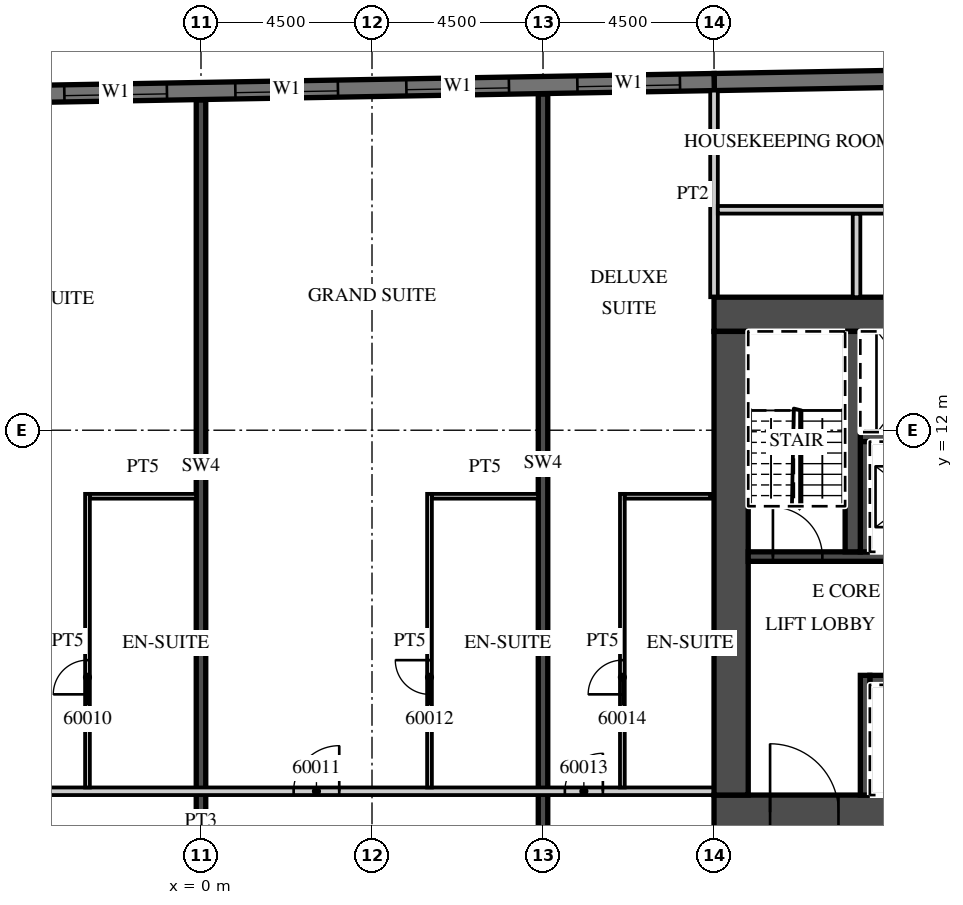
"""IFC4 building model, lengths in metres.
Left out: names, types, materials, properties, quantities, classifications, styles, units other than length and angle.
Written with IfcOpenShell. Run it as: python <this file> out.ifc"""

import sys

from ifc_helpers import new_model, si_unit, direction, frame, frame_2d, origin, place, context, subcontext, project, spatial, rectangle, extrude, element, fill, save


model = new_model("IFC4")
c1 = context("Model", 3, precision=1e-05, world=origin(), true_north=direction((0.0, 1.0)))
c2 = subcontext(c1, "Body", "Model", "MODEL_VIEW")
j1 = project(units=[si_unit("LENGTHUNIT", "METRE"), si_unit("PLANEANGLEUNIT", "RADIAN")], contexts=[c1])
p1 = place(None, origin())
s1 = spatial("IfcSite", under=j1, at=p1, CompositionType="ELEMENT")
p2 = place(p1, origin())
s2 = spatial("IfcBuilding", under=s1, at=p2, CompositionType="ELEMENT")
p3 = place(p2, frame((0.0, 0.0, 244.1)))
s3 = spatial("IfcBuildingStorey", under=s2, at=p3, CompositionType="ELEMENT", Elevation=244.1)
p4 = place(p3, frame((0.0, 1.4, 0.0), z_axis=(0.0, 0.0, 1.0), x_axis=(0.0, 1.0, 0.0)))
e1 = element("IfcWall", 1, at=p4, inside=s3, PredefinedType="SHEAR", context=c2, shape_type="SweptSolid", body=[
    extrude(rectangle(XDim=19.289, YDim=0.25, at=frame_2d((9.644, 0.0))), origin(), (0.0, 0.0, 1.0), 3.3),
])
p5 = place(p3, frame((9.0, 1.4, 0.0), z_axis=(0.0, 0.0, 1.0), x_axis=(0.0, 1.0, 0.0)))
e2 = element("IfcWall", 2, at=p5, inside=s3, PredefinedType="SHEAR", context=c2, shape_type="SweptSolid", body=[
    extrude(rectangle(XDim=19.446, YDim=0.25, at=frame_2d((9.723, 0.0))), origin(), (0.0, 0.0, 1.0), 3.3),
])
p6 = place(p3, frame((31.504, 21.476, 0.0), z_axis=(0.0, 0.0, 1.0), x_axis=(-0.999847677887, -0.017453395744, 0.0)))
e3 = element("IfcWall", 3, at=p6, inside=s3, PredefinedType="SOLIDWALL", context=c2, shape_type="SweptSolid", body=[
    extrude(rectangle(XDim=18.003, YDim=0.45, at=frame_2d((9.001, 0.0))), origin(), (0.0, 0.0, 1.0), 3.02),
])
p7 = place(p3, frame((13.504, 21.161, 0.0), z_axis=(0.0, 0.0, 1.0), x_axis=(-0.999847763257, -0.017448504532, 0.0)))
e4 = element("IfcWall", 4, at=p7, inside=s3, PredefinedType="SOLIDWALL", context=c2, shape_type="SweptSolid", body=[
    extrude(rectangle(XDim=46.859, YDim=0.45, at=frame_2d((23.43, 0.0))), origin(), (0.0, 0.0, 1.0), 3.02),
])
p8 = place(p7, frame((0.9, 0.0, 0.45)))
e5 = element("IfcOpeningElement", 5, at=p8, cuts=e4, PredefinedType="OPENING", context=c2, shape_type="SweptSolid", body=[
    extrude(rectangle(XDim=2.7, YDim=2.25, at=frame_2d((1.35, 1.125))), frame((0.0, 0.235, 0.0), z_axis=(0.0, -1.0, 0.0), x_axis=(1.0, 0.0, 0.0)), (0.0, 0.0, 1.0), 0.47),
])
p9 = place(p7, frame((5.401, 0.0, 0.45)))
e6 = element("IfcOpeningElement", 6, at=p9, cuts=e4, PredefinedType="OPENING", context=c2, shape_type="SweptSolid", body=[
    extrude(rectangle(XDim=2.7, YDim=2.25, at=frame_2d((1.35, 1.125))), frame((0.0, 0.235, 0.0), z_axis=(0.0, -1.0, 0.0), x_axis=(1.0, 0.0, 0.0)), (0.0, 0.0, 1.0), 0.47),
])
p10 = place(p7, frame((9.902, 0.0, 0.45)))
e7 = element("IfcOpeningElement", 7, at=p10, cuts=e4, PredefinedType="OPENING", context=c2, shape_type="SweptSolid", body=[
    extrude(rectangle(XDim=2.7, YDim=2.25, at=frame_2d((1.35, 1.125))), frame((0.0, 0.235, 0.0), z_axis=(0.0, -1.0, 0.0), x_axis=(1.0, 0.0, 0.0)), (0.0, 0.0, 1.0), 0.47),
])
p11 = place(p7, frame((14.402, 0.0, 0.45)))
e8 = element("IfcOpeningElement", 8, at=p11, cuts=e4, PredefinedType="OPENING", context=c2, shape_type="SweptSolid", body=[
    extrude(rectangle(XDim=2.7, YDim=2.25, at=frame_2d((1.35, 1.125))), frame((0.0, 0.235, 0.0), z_axis=(0.0, -1.0, 0.0), x_axis=(1.0, 0.0, 0.0)), (0.0, 0.0, 1.0), 0.47),
])
p12 = place(p7, frame((18.903, 0.0, 0.45)))
e9 = element("IfcOpeningElement", 9, at=p12, cuts=e4, PredefinedType="OPENING", context=c2, shape_type="SweptSolid", body=[
    extrude(rectangle(XDim=2.7, YDim=2.25, at=frame_2d((1.35, 1.125))), frame((0.0, 0.235, 0.0), z_axis=(0.0, -1.0, 0.0), x_axis=(1.0, 0.0, 0.0)), (0.0, 0.0, 1.0), 0.47),
])
p13 = place(p7, frame((23.404, 0.0, 0.45)))
e10 = element("IfcOpeningElement", 10, at=p13, cuts=e4, PredefinedType="OPENING", context=c2, shape_type="SweptSolid", body=[
    extrude(rectangle(XDim=2.7, YDim=2.25, at=frame_2d((1.35, 1.125))), frame((0.0, 0.235, 0.0), z_axis=(0.0, -1.0, 0.0), x_axis=(1.0, 0.0, 0.0)), (0.0, 0.0, 1.0), 0.47),
])
p14 = place(p7, frame((27.904, 0.0, 0.45)))
e11 = element("IfcOpeningElement", 11, at=p14, cuts=e4, PredefinedType="OPENING", context=c2, shape_type="SweptSolid", body=[
    extrude(rectangle(XDim=2.7, YDim=2.25, at=frame_2d((1.35, 1.125))), frame((0.0, 0.235, 0.0), z_axis=(0.0, -1.0, 0.0), x_axis=(1.0, 0.0, 0.0)), (0.0, 0.0, 1.0), 0.47),
])
p15 = place(p7, frame((32.405, 0.0, 0.45)))
e12 = element("IfcOpeningElement", 12, at=p15, cuts=e4, PredefinedType="OPENING", context=c2, shape_type="SweptSolid", body=[
    extrude(rectangle(XDim=2.7, YDim=2.25, at=frame_2d((1.35, 1.125))), frame((0.0, 0.235, 0.0), z_axis=(0.0, -1.0, 0.0), x_axis=(1.0, 0.0, 0.0)), (0.0, 0.0, 1.0), 0.47),
])
p16 = place(p7, frame((36.906, 0.0, 0.45)))
e13 = element("IfcOpeningElement", 13, at=p16, cuts=e4, PredefinedType="OPENING", context=c2, shape_type="SweptSolid", body=[
    extrude(rectangle(XDim=2.7, YDim=2.25, at=frame_2d((1.35, 1.125))), frame((0.0, 0.235, 0.0), z_axis=(0.0, -1.0, 0.0), x_axis=(1.0, 0.0, 0.0)), (0.0, 0.0, 1.0), 0.47),
])
p17 = place(p7, frame((41.406, 0.0, 0.45)))
e14 = element("IfcOpeningElement", 14, at=p17, cuts=e4, PredefinedType="OPENING", context=c2, shape_type="SweptSolid", body=[
    extrude(rectangle(XDim=2.7, YDim=2.25, at=frame_2d((1.35, 1.125))), frame((0.0, 0.235, 0.0), z_axis=(0.0, -1.0, 0.0), x_axis=(1.0, 0.0, 0.0)), (0.0, 0.0, 1.0), 0.47),
])
p18 = place(p3, frame((13.5, 15.5, 0.0), z_axis=(0.0, 0.0, 1.0), x_axis=(0.0, 1.0, 0.0)))
e15 = element("IfcWall", 15, at=p18, inside=s3, PredefinedType="PARTITIONING", context=c2, shape_type="SweptSolid", body=[
    extrude(rectangle(XDim=5.436, YDim=0.2, at=frame_2d((2.718, 0.0))), origin(), (0.0, 0.0, 1.0), 3.02),
])
p19 = place(p3, frame((-13.5, 2.5, 0.0), z_axis=(0.0, 0.0, 1.0), x_axis=(1.0, 0.0, 0.0)))
e16 = element("IfcWall", 16, at=p19, inside=s3, PredefinedType="PARTITIONING", context=c2, shape_type="SweptSolid", body=[
    extrude(rectangle(XDim=27.0, YDim=0.2, at=frame_2d((13.5, 0.0))), origin(), (0.0, 0.0, 1.0), 3.02),
])
p20 = place(p19, frame((0.575, 0.0, 0.0)))
e17 = element("IfcOpeningElement", 17, at=p20, cuts=e16, PredefinedType="OPENING", context=c2, shape_type="SweptSolid", body=[
    extrude(rectangle(XDim=1.0, YDim=2.1, at=frame_2d((0.5, 1.05))), frame((0.0, 0.11, 0.0), z_axis=(0.0, -1.0, 0.0), x_axis=(1.0, 0.0, 0.0)), (0.0, 0.0, 1.0), 0.22),
])
p21 = place(p19, frame((6.938, 0.0, 0.0)))
e18 = element("IfcOpeningElement", 18, at=p21, cuts=e16, PredefinedType="OPENING", context=c2, shape_type="SweptSolid", body=[
    extrude(rectangle(XDim=1.2, YDim=2.1, at=frame_2d((0.6, 1.05))), frame((0.0, 0.11, 0.0), z_axis=(0.0, -1.0, 0.0), x_axis=(1.0, 0.0, 0.0)), (0.0, 0.0, 1.0), 0.22),
])
p22 = place(p19, frame((15.938, 0.0, 0.0)))
e19 = element("IfcOpeningElement", 19, at=p22, cuts=e16, PredefinedType="OPENING", context=c2, shape_type="SweptSolid", body=[
    extrude(rectangle(XDim=1.2, YDim=2.1, at=frame_2d((0.6, 1.05))), frame((0.0, 0.11, 0.0), z_axis=(0.0, -1.0, 0.0), x_axis=(1.0, 0.0, 0.0)), (0.0, 0.0, 1.0), 0.22),
])
p23 = place(p19, frame((23.075, 0.0, 0.0)))
e20 = element("IfcOpeningElement", 20, at=p23, cuts=e16, PredefinedType="OPENING", context=c2, shape_type="SweptSolid", body=[
    extrude(rectangle(XDim=1.0, YDim=2.1, at=frame_2d((0.5, 1.05))), frame((0.0, 0.11, 0.0), z_axis=(0.0, -1.0, 0.0), x_axis=(1.0, 0.0, 0.0)), (0.0, 0.0, 1.0), 0.22),
])
p24 = place(p3, frame((-2.987, 2.6, 0.0), z_axis=(0.0, 0.0, 1.0), x_axis=(0.0, 1.0, 0.0)))
e21 = element("IfcWall", 21, at=p24, inside=s3, PredefinedType="PARTITIONING", context=c2, shape_type="SweptSolid", body=[
    extrude(rectangle(XDim=7.725, YDim=0.125, at=frame_2d((3.862, 0.0))), origin(), (0.0, 0.0, 1.0), 3.02),
])
p25 = place(p24, frame((2.45, 0.0, 0.0)))
e22 = element("IfcOpeningElement", 22, at=p25, cuts=e21, PredefinedType="OPENING", context=c2, shape_type="SweptSolid", body=[
    extrude(rectangle(XDim=0.9, YDim=2.1, at=frame_2d((0.45, 1.05))), frame((0.0, 0.073, 0.0), z_axis=(0.0, -1.0, 0.0), x_axis=(1.0, 0.0, 0.0)), (0.0, 0.0, 1.0), 0.145),
])
p26 = place(p3, frame((-2.925, 10.262, 0.0), z_axis=(0.0, 0.0, 1.0), x_axis=(1.0, 0.0, 0.0)))
e23 = element("IfcWall", 23, at=p26, inside=s3, PredefinedType="PARTITIONING", context=c2, shape_type="SweptSolid", body=[
    extrude(rectangle(XDim=2.8, YDim=0.125, at=frame_2d((1.4, 0.0))), origin(), (0.0, 0.0, 1.0), 3.02),
])
p27 = place(p3, frame((6.013, 2.6, 0.0), z_axis=(0.0, 0.0, 1.0), x_axis=(0.0, 1.0, 0.0)))
e24 = element("IfcWall", 24, at=p27, inside=s3, PredefinedType="PARTITIONING", context=c2, shape_type="SweptSolid", body=[
    extrude(rectangle(XDim=7.725, YDim=0.125, at=frame_2d((3.862, 0.0))), origin(), (0.0, 0.0, 1.0), 3.02),
])
p28 = place(p27, frame((2.45, 0.0, 0.0)))
e25 = element("IfcOpeningElement", 25, at=p28, cuts=e24, PredefinedType="OPENING", context=c2, shape_type="SweptSolid", body=[
    extrude(rectangle(XDim=0.9, YDim=2.1, at=frame_2d((0.45, 1.05))), frame((0.0, 0.073, 0.0), z_axis=(0.0, -1.0, 0.0), x_axis=(1.0, 0.0, 0.0)), (0.0, 0.0, 1.0), 0.145),
])
p29 = place(p3, frame((6.075, 10.262, 0.0), z_axis=(0.0, 0.0, 1.0), x_axis=(1.0, 0.0, 0.0)))
e26 = element("IfcWall", 26, at=p29, inside=s3, PredefinedType="PARTITIONING", context=c2, shape_type="SweptSolid", body=[
    extrude(rectangle(XDim=2.8, YDim=0.125, at=frame_2d((1.4, 0.0))), origin(), (0.0, 0.0, 1.0), 3.02),
])
p30 = place(p3, frame((11.088, 2.6, 0.0), z_axis=(0.0, 0.0, 1.0), x_axis=(0.0, 1.0, 0.0)))
e27 = element("IfcWall", 27, at=p30, inside=s3, PredefinedType="PARTITIONING", context=c2, shape_type="SweptSolid", body=[
    extrude(rectangle(XDim=7.725, YDim=0.125, at=frame_2d((3.862, 0.0))), origin(), (0.0, 0.0, 1.0), 3.02),
])
p31 = place(p30, frame((2.45, 0.0, 0.0)))
e28 = element("IfcOpeningElement", 28, at=p31, cuts=e27, PredefinedType="OPENING", context=c2, shape_type="SweptSolid", body=[
    extrude(rectangle(XDim=0.9, YDim=2.1, at=frame_2d((0.45, 1.05))), frame((0.0, 0.073, 0.0), z_axis=(0.0, -1.0, 0.0), x_axis=(1.0, 0.0, 0.0)), (0.0, 0.0, 1.0), 0.145),
])
p32 = place(p3, frame((11.15, 10.262, 0.0), z_axis=(0.0, 0.0, 1.0), x_axis=(1.0, 0.0, 0.0)))
e29 = element("IfcWall", 29, at=p32, inside=s3, PredefinedType="PARTITIONING", context=c2, shape_type="SweptSolid", body=[
    extrude(rectangle(XDim=2.25, YDim=0.125, at=frame_2d((1.125, 0.0))), origin(), (0.0, 0.0, 1.0), 3.02),
])
p33 = place(p3, frame((13.5, 1.95, 0.0), z_axis=(0.0, 0.0, 1.0), x_axis=(1.0, 0.0, 0.0)))
e30 = element("IfcWall", 30, at=p33, inside=s3, PredefinedType="SHEAR", context=c2, shape_type="SweptSolid", body=[
    extrude(rectangle(XDim=18.0, YDim=0.9, at=frame_2d((9.0, 0.0))), origin(), (0.0, 0.0, 1.0), 3.02),
])
p34 = place(p33, frame((1.475, 0.0, 0.0)))
e31 = element("IfcOpeningElement", 31, at=p34, cuts=e30, PredefinedType="OPENING", context=c2, shape_type="SweptSolid", body=[
    extrude(rectangle(XDim=1.8, YDim=2.1, at=frame_2d((0.9, 1.05))), frame((0.0, 0.46, 0.0), z_axis=(0.0, -1.0, 0.0), x_axis=(1.0, 0.0, 0.0)), (0.0, 0.0, 1.0), 0.92),
])
p35 = place(p3, frame((13.5, 15.05, 0.0), z_axis=(0.0, 0.0, 1.0), x_axis=(1.0, 0.0, 0.0)))
e32 = element("IfcWall", 32, at=p35, inside=s3, PredefinedType="SHEAR", context=c2, shape_type="SweptSolid", body=[
    extrude(rectangle(XDim=6.8, YDim=0.9, at=frame_2d((3.4, 0.0))), origin(), (0.0, 0.0, 1.0), 3.02),
])
p36 = place(p35, frame((4.725, 0.0, 0.0)))
e33 = element("IfcOpeningElement", 33, at=p36, cuts=e32, PredefinedType="OPENING", context=c2, shape_type="SweptSolid", body=[
    extrude(rectangle(XDim=1.2, YDim=2.1, at=frame_2d((0.6, 1.05))), frame((0.0, 0.46, 0.0), z_axis=(0.0, -1.0, 0.0), x_axis=(1.0, 0.0, 0.0)), (0.0, 0.0, 1.0), 0.92),
])
p37 = place(p3, frame((13.95, 2.4, 0.0), z_axis=(0.0, 0.0, 1.0), x_axis=(0.0, 1.0, 0.0)))
e34 = element("IfcWall", 34, at=p37, inside=s3, PredefinedType="SHEAR", context=c2, shape_type="SweptSolid", body=[
    extrude(rectangle(XDim=12.2, YDim=0.9, at=frame_2d((6.1, 0.0))), origin(), (0.0, 0.0, 1.0), 3.02),
])
p38 = place(p3, frame((17.6, 5.425, 0.0), z_axis=(0.0, 0.0, 1.0), x_axis=(1.0, 0.0, 0.0)))
e35 = element("IfcWall", 35, at=p38, inside=s3, PredefinedType="SHEAR", context=c2, shape_type="SweptSolid", body=[
    extrude(rectangle(XDim=13.0, YDim=0.25, at=frame_2d((6.5, 0.0))), origin(), (0.0, 0.0, 1.0), 3.02),
])
p39 = place(p38, frame((8.475, 0.0, 0.0)))
e36 = element("IfcOpeningElement", 36, at=p39, cuts=e35, PredefinedType="OPENING", context=c2, shape_type="SweptSolid", body=[
    extrude(rectangle(XDim=1.2, YDim=2.1, at=frame_2d((0.6, 1.05))), frame((0.0, 0.135, 0.0), z_axis=(0.0, -1.0, 0.0), x_axis=(1.0, 0.0, 0.0)), (0.0, 0.0, 1.0), 0.27),
])
p40 = place(p38, frame((5.875, 0.0, 0.0)))
e37 = element("IfcOpeningElement", 37, at=p40, cuts=e35, PredefinedType="OPENING", context=c2, shape_type="SweptSolid", body=[
    extrude(rectangle(XDim=1.2, YDim=2.1, at=frame_2d((0.6, 1.05))), frame((0.0, 0.135, 0.0), z_axis=(0.0, -1.0, 0.0), x_axis=(1.0, 0.0, 0.0)), (0.0, 0.0, 1.0), 0.27),
])
p41 = place(p3, frame((17.475, 2.4, 0.0), z_axis=(0.0, 0.0, 1.0), x_axis=(0.0, 1.0, 0.0)))
e38 = element("IfcWall", 38, at=p41, inside=s3, PredefinedType="SHEAR", context=c2, shape_type="SweptSolid", body=[
    extrude(rectangle(XDim=3.15, YDim=0.25, at=frame_2d((1.575, 0.0))), origin(), (0.0, 0.0, 1.0), 3.02),
])
p42 = place(p3, frame((14.4, 8.675, 0.0), z_axis=(0.0, 0.0, 1.0), x_axis=(1.0, 0.0, 0.0)))
e39 = element("IfcWall", 39, at=p42, inside=s3, PredefinedType="SHEAR", context=c2, shape_type="SweptSolid", body=[
    extrude(rectangle(XDim=16.2, YDim=0.25, at=frame_2d((8.1, 0.0))), origin(), (0.0, 0.0, 1.0), 3.02),
])
p43 = place(p42, frame((6.45, 0.0, 0.0)))
e40 = element("IfcOpeningElement", 40, at=p43, cuts=e39, PredefinedType="OPENING", context=c2, shape_type="SweptSolid", body=[
    extrude(rectangle(XDim=1.2, YDim=2.1, at=frame_2d((0.6, 1.05))), frame((0.0, 0.135, 0.0), z_axis=(0.0, -1.0, 0.0), x_axis=(1.0, 0.0, 0.0)), (0.0, 0.0, 1.0), 0.27),
])
p44 = place(p42, frame((3.8, 0.0, 0.0)))
e41 = element("IfcOpeningElement", 41, at=p44, cuts=e39, PredefinedType="OPENING", context=c2, shape_type="SweptSolid", body=[
    extrude(rectangle(XDim=1.2, YDim=2.1, at=frame_2d((0.6, 1.05))), frame((0.0, 0.135, 0.0), z_axis=(0.0, -1.0, 0.0), x_axis=(1.0, 0.0, 0.0)), (0.0, 0.0, 1.0), 0.27),
])
p45 = place(p42, frame((0.65, 0.0, 0.0)))
e42 = element("IfcOpeningElement", 42, at=p45, cuts=e39, PredefinedType="OPENING", context=c2, shape_type="SweptSolid", body=[
    extrude(rectangle(XDim=1.3, YDim=2.1, at=frame_2d((0.65, 1.05))), frame((0.0, 0.135, 0.0), z_axis=(0.0, -1.0, 0.0), x_axis=(1.0, 0.0, 0.0)), (0.0, 0.0, 1.0), 0.27),
])
p46 = place(p42, frame((13.913, 0.0, 0.0)))
e43 = element("IfcOpeningElement", 43, at=p46, cuts=e39, PredefinedType="OPENING", context=c2, shape_type="SweptSolid", body=[
    extrude(rectangle(XDim=1.0, YDim=2.1, at=frame_2d((0.5, 1.05))), frame((0.0, 0.135, 0.0), z_axis=(0.0, -1.0, 0.0), x_axis=(1.0, 0.0, 0.0)), (0.0, 0.0, 1.0), 0.27),
])
p47 = place(p42, frame((9.938, 0.0, 0.0)))
e44 = element("IfcOpeningElement", 44, at=p47, cuts=e39, PredefinedType="OPENING", context=c2, shape_type="SweptSolid", body=[
    extrude(rectangle(XDim=1.0, YDim=2.1, at=frame_2d((0.5, 1.05))), frame((0.0, 0.135, 0.0), z_axis=(0.0, -1.0, 0.0), x_axis=(1.0, 0.0, 0.0)), (0.0, 0.0, 1.0), 0.27),
])
p48 = place(p3, frame((17.35, 11.825, 0.0), z_axis=(0.0, 0.0, 1.0), x_axis=(1.0, 0.0, 0.0)))
e45 = element("IfcWall", 45, at=p48, inside=s3, PredefinedType="SHEAR", context=c2, shape_type="SweptSolid", body=[
    extrude(rectangle(XDim=13.25, YDim=0.25, at=frame_2d((6.625, 0.0))), origin(), (0.0, 0.0, 1.0), 3.02),
])
p49 = place(p3, frame((17.475, 8.8, 0.0), z_axis=(0.0, 0.0, 1.0), x_axis=(0.0, 1.0, 0.0)))
e46 = element("IfcWall", 46, at=p49, inside=s3, PredefinedType="SHEAR", context=c2, shape_type="SweptSolid", body=[
    extrude(rectangle(XDim=2.9, YDim=0.25, at=frame_2d((1.45, 0.0))), origin(), (0.0, 0.0, 1.0), 3.02),
])
p50 = place(p3, frame((17.15, 8.8, 0.0), z_axis=(0.0, 0.0, 1.0), x_axis=(0.0, 1.0, 0.0)))
e47 = element("IfcWall", 47, at=p50, inside=s3, PredefinedType="SHEAR", context=c2, shape_type="SweptSolid", body=[
    extrude(rectangle(XDim=5.8, YDim=0.4, at=frame_2d((2.9, 0.0))), origin(), (0.0, 0.0, 1.0), 3.02),
])
p51 = place(p3, frame((17.25, 15.5, 0.0), z_axis=(0.0, 0.0, 1.0), x_axis=(0.0, 1.0, 0.0)))
e48 = element("IfcWall", 48, at=p51, inside=s3, PredefinedType="PARTITIONING", context=c2, shape_type="SweptSolid", body=[
    extrude(rectangle(XDim=2.2, YDim=0.2, at=frame_2d((1.1, 0.0))), origin(), (0.0, 0.0, 1.0), 3.02),
])
p52 = place(p3, frame((13.6, 17.8, 0.0), z_axis=(0.0, 0.0, 1.0), x_axis=(1.0, 0.0, 0.0)))
e49 = element("IfcWall", 49, at=p52, inside=s3, PredefinedType="PARTITIONING", context=c2, shape_type="SweptSolid", body=[
    extrude(rectangle(XDim=28.657, YDim=0.2, at=frame_2d((14.329, 0.0))), origin(), (0.0, 0.0, 1.0), 3.02),
])
p53 = place(p52, frame((17.812, 0.0, 0.0)))
e50 = element("IfcOpeningElement", 50, at=p53, cuts=e49, PredefinedType="OPENING", context=c2, shape_type="SweptSolid", body=[
    extrude(rectangle(XDim=0.9, YDim=2.1, at=frame_2d((0.45, 1.05))), frame((0.0, 0.11, 0.0), z_axis=(0.0, -1.0, 0.0), x_axis=(1.0, 0.0, 0.0)), (0.0, 0.0, 1.0), 0.22),
])
p54 = place(p52, frame((9.512, 0.0, 0.0)))
e51 = element("IfcOpeningElement", 51, at=p54, cuts=e49, PredefinedType="OPENING", context=c2, shape_type="SweptSolid", body=[
    extrude(rectangle(XDim=0.9, YDim=2.1, at=frame_2d((0.45, 1.05))), frame((0.0, 0.11, 0.0), z_axis=(0.0, -1.0, 0.0), x_axis=(1.0, 0.0, 0.0)), (0.0, 0.0, 1.0), 0.22),
])
p55 = place(p8, origin())
e52 = element("IfcWindow", 52, at=p55, inside=s3, PartitioningType="SINGLE_PANEL", PredefinedType="WINDOW", context=c2, shape_type="SweptSolid", body=[
    extrude(rectangle(XDim=2.7, YDim=2.25, at=frame_2d((1.35, 1.125))), frame((0.0, 0.09, 0.0), z_axis=(0.0, -1.0, 0.0), x_axis=(1.0, 0.0, 0.0)), (0.0, 0.0, 1.0), 0.06),
])
fill(e5, e52)
p56 = place(p9, origin())
e53 = element("IfcWindow", 53, at=p56, inside=s3, PartitioningType="SINGLE_PANEL", PredefinedType="WINDOW", context=c2, shape_type="SweptSolid", body=[
    extrude(rectangle(XDim=2.7, YDim=2.25, at=frame_2d((1.35, 1.125))), frame((0.0, 0.09, 0.0), z_axis=(0.0, -1.0, 0.0), x_axis=(1.0, 0.0, 0.0)), (0.0, 0.0, 1.0), 0.06),
])
fill(e6, e53)
p57 = place(p10, origin())
e54 = element("IfcWindow", 54, at=p57, inside=s3, PartitioningType="SINGLE_PANEL", PredefinedType="WINDOW", context=c2, shape_type="SweptSolid", body=[
    extrude(rectangle(XDim=2.7, YDim=2.25, at=frame_2d((1.35, 1.125))), frame((0.0, 0.09, 0.0), z_axis=(0.0, -1.0, 0.0), x_axis=(1.0, 0.0, 0.0)), (0.0, 0.0, 1.0), 0.06),
])
fill(e7, e54)
p58 = place(p11, origin())
e55 = element("IfcWindow", 55, at=p58, inside=s3, PartitioningType="SINGLE_PANEL", PredefinedType="WINDOW", context=c2, shape_type="SweptSolid", body=[
    extrude(rectangle(XDim=2.7, YDim=2.25, at=frame_2d((1.35, 1.125))), frame((0.0, 0.09, 0.0), z_axis=(0.0, -1.0, 0.0), x_axis=(1.0, 0.0, 0.0)), (0.0, 0.0, 1.0), 0.06),
])
fill(e8, e55)
p59 = place(p25, origin())
e56 = element("IfcDoor", 56, at=p59, inside=s3, OperationType="SINGLE_SWING_LEFT", PredefinedType="DOOR", context=c2, shape_type="SweptSolid", body=[
    extrude(rectangle(XDim=0.9, YDim=2.1, at=frame_2d((0.45, 1.05))), frame((0.0, 0.025, 0.0), z_axis=(0.0, -1.0, 0.0), x_axis=(1.0, 0.0, 0.0)), (0.0, 0.0, 1.0), 0.05),
])
fill(e22, e56)
p60 = place(p22, origin())
e57 = element("IfcDoor", 57, at=p60, inside=s3, OperationType="SINGLE_SWING_RIGHT", PredefinedType="DOOR", context=c2, shape_type="SweptSolid", body=[
    extrude(rectangle(XDim=1.2, YDim=2.1, at=frame_2d((0.6, 1.05))), frame((0.0, 0.025, 0.0), z_axis=(0.0, -1.0, 0.0), x_axis=(1.0, 0.0, 0.0)), (0.0, 0.0, 1.0), 0.05),
])
fill(e19, e57)
p61 = place(p28, origin())
e58 = element("IfcDoor", 58, at=p61, inside=s3, OperationType="SINGLE_SWING_RIGHT", PredefinedType="DOOR", context=c2, shape_type="SweptSolid", body=[
    extrude(rectangle(XDim=0.9, YDim=2.1, at=frame_2d((0.45, 1.05))), frame((0.0, 0.025, 0.0), z_axis=(0.0, -1.0, 0.0), x_axis=(1.0, 0.0, 0.0)), (0.0, 0.0, 1.0), 0.05),
])
fill(e25, e58)
p62 = place(p23, origin())
e59 = element("IfcDoor", 59, at=p62, inside=s3, OperationType="SINGLE_SWING_RIGHT", PredefinedType="DOOR", context=c2, shape_type="SweptSolid", body=[
    extrude(rectangle(XDim=1.0, YDim=2.1, at=frame_2d((0.5, 1.05))), frame((0.0, 0.025, 0.0), z_axis=(0.0, -1.0, 0.0), x_axis=(1.0, 0.0, 0.0)), (0.0, 0.0, 1.0), 0.05),
])
fill(e20, e59)
p63 = place(p31, origin())
e60 = element("IfcDoor", 60, at=p63, inside=s3, OperationType="SINGLE_SWING_LEFT", PredefinedType="DOOR", context=c2, shape_type="SweptSolid", body=[
    extrude(rectangle(XDim=0.9, YDim=2.1, at=frame_2d((0.45, 1.05))), frame((0.0, 0.025, 0.0), z_axis=(0.0, -1.0, 0.0), x_axis=(1.0, 0.0, 0.0)), (0.0, 0.0, 1.0), 0.05),
])
fill(e28, e60)
p64 = place(p34, origin())
e61 = element("IfcDoor", 61, at=p64, inside=s3, OperationType="DOUBLE_DOOR_DOUBLE_SWING", PredefinedType="DOOR", context=c2, shape_type="SweptSolid", body=[
    extrude(rectangle(XDim=1.8, YDim=2.1, at=frame_2d((0.9, 1.05))), frame((0.0, 0.025, 0.0), z_axis=(0.0, -1.0, 0.0), x_axis=(1.0, 0.0, 0.0)), (0.0, 0.0, 1.0), 0.05),
])
fill(e31, e61)
p65 = place(p45, origin())
e62 = element("IfcDoor", 62, at=p65, inside=s3, OperationType="SINGLE_SWING_LEFT", PredefinedType="DOOR", context=c2, shape_type="SweptSolid", body=[
    extrude(rectangle(XDim=1.3, YDim=2.1, at=frame_2d((0.65, 1.05))), frame((0.0, 0.025, 0.0), z_axis=(0.0, -1.0, 0.0), x_axis=(1.0, 0.0, 0.0)), (0.0, 0.0, 1.0), 0.05),
])
fill(e42, e62)
save(model, sys.argv[1])
